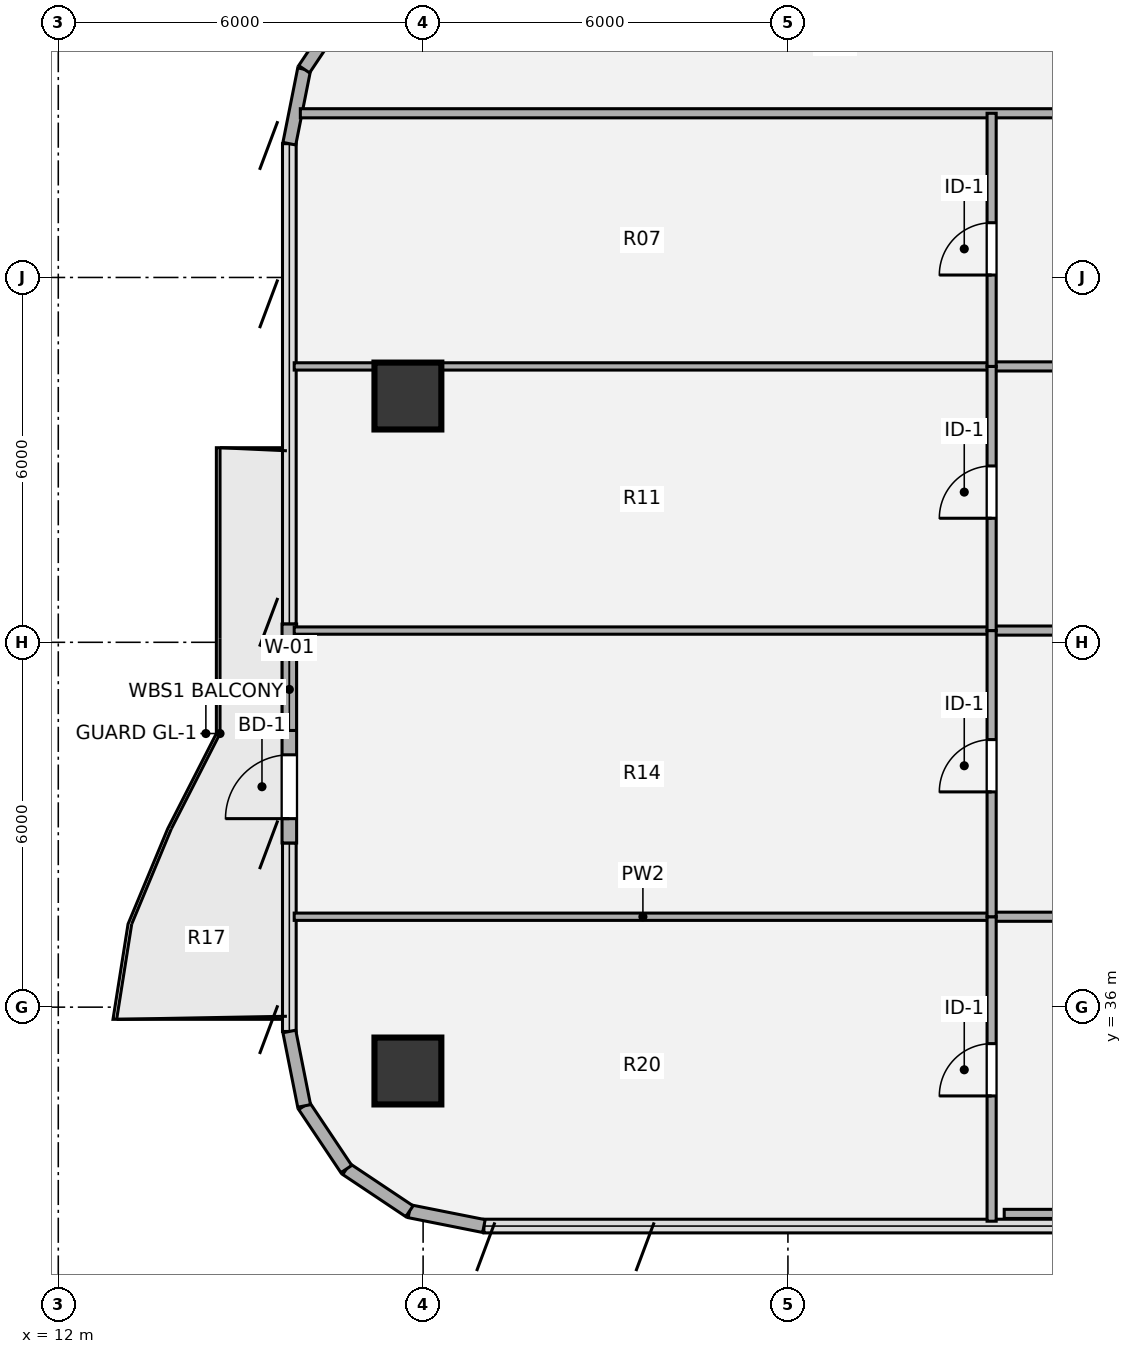
"""IFC4 building model, lengths in metres.
Left out: names, types, materials, properties, quantities, classifications, styles, units other than length and angle.
Written with IfcOpenShell. Run it as: python <this file> out.ifc"""

import sys

from ifc_helpers import new_model, si_unit, direction, frame, frame_2d, origin, origin_2d, place, context, subcontext, project, spatial, rectangle, hollow_circle, extrude, source, transform, mapped, element, fill, save


model = new_model("IFC4")
c1 = context("Model", 3, precision=1e-05, world=origin(), true_north=direction((0.0, 1.0)))
c2 = subcontext(c1, "Body", "Model", "MODEL_VIEW")
j1 = project(units=[si_unit("LENGTHUNIT", "METRE"), si_unit("PLANEANGLEUNIT", "RADIAN")], contexts=[c1])
p1 = place(None, origin())
s1 = spatial("IfcSite", under=j1, at=p1, CompositionType="ELEMENT")
p2 = place(p1, origin())
s2 = spatial("IfcBuilding", under=s1, at=p2, CompositionType="ELEMENT")
p3 = place(p2, frame((0.0, 0.0, 198.0)))
s3 = spatial("IfcBuildingStorey", under=s2, at=p3, CompositionType="ELEMENT", Elevation=198.0)
m1 = source(origin(), c2, "Body", "SweptSolid", [
    extrude(hollow_circle(Radius=0.55, WallThickness=0.04, at=origin_2d()), origin(), (0.0, 0.0, 1.0), 3.78),
])
for number, where, z_axis, x_axis in (
    (1, (17.75, 34.95, 0.0), (0.0, 0.0, 1.0), (1.0, 0.0, 0.0)),
    (2, (17.75, 46.05, 0.0), (0.0, 0.0, 1.0), (1.0, 0.0, 0.0)),
):
    element("IfcColumn", number, at=place(p3, frame(where, z_axis=z_axis, x_axis=x_axis)), inside=s3, PredefinedType="COLUMN", context=c2, shape_type="MappedRepresentation", body=[
        mapped(m1, transform((0.0, 0.0, 0.0), x_axis=(1.0, 0.0, 0.0), y_axis=(0.0, 1.0, 0.0), z_axis=(0.0, 0.0, 1.0), scale=1.0)),
    ])
for number, where, z_axis, x_axis in (
    (3, (19.0, 32.4, 0.0), (0.0, 0.0, 1.0), (-0.981, 0.195, 0.0)),
    (4, (17.775, 32.644, 0.0), (0.0, 0.0, 1.0), (-0.831, 0.556, 0.0)),
    (5, (16.737, 33.337, 0.0), (0.0, 0.0, 1.0), (-0.556, 0.831, 0.0)),
    (6, (16.044, 34.375, 0.0), (0.0, 0.0, 1.0), (-0.195, 0.981, 0.0)),
):
    element("IfcWall", number, at=place(p3, frame(where, z_axis=z_axis, x_axis=x_axis)), inside=s3, PredefinedType="SOLIDWALL", context=c2, shape_type="SweptSolid", body=[
        extrude(rectangle(XDim=1.249, YDim=0.215, at=frame_2d((0.624, 0.0))), origin(), (0.0, 0.0, 1.0), 3.53),
    ])
p4 = place(p3, frame((15.8, 38.7, 0.0), z_axis=(0.0, 0.0, 1.0), x_axis=(0.0, 1.0, 0.0)))
e7 = element("IfcWall", 7, at=p4, inside=s3, PredefinedType="SOLIDWALL", context=c2, shape_type="SweptSolid", body=[
    extrude(rectangle(XDim=3.6, YDim=0.24, at=frame_2d((1.8, 0.0))), origin(), (0.0, 0.0, 1.0), 3.53),
])
p5 = place(p4, frame((0.4, 0.0, 0.0)))
e8 = element("IfcOpeningElement", 8, at=p5, cuts=e7, PredefinedType="OPENING", context=c2, shape_type="SweptSolid", body=[
    extrude(rectangle(XDim=1.05, YDim=2.15, at=origin_2d()), frame((0.525, 0.13, 1.075), z_axis=(0.0, -1.0, 0.0), x_axis=(1.0, 0.0, 0.0)), (0.0, 0.0, 1.0), 0.26),
])
p6 = place(p4, frame((1.85, 0.0, 0.85)))
e9 = element("IfcOpeningElement", 9, at=p6, cuts=e7, PredefinedType="OPENING", context=c2, shape_type="SweptSolid", body=[
    extrude(rectangle(XDim=1.35, YDim=1.35, at=origin_2d()), frame((0.675, 0.13, 0.675), z_axis=(0.0, -1.0, 0.0), x_axis=(1.0, 0.0, 0.0)), (0.0, 0.0, 1.0), 0.26),
])
for number, where, z_axis, x_axis in (
    (10, (15.8, 50.2, 0.0), (0.0, 0.0, 1.0), (0.195, 0.981, 0.0)),
    (11, (16.044, 51.425, 0.0), (0.0, 0.0, 1.0), (0.556, 0.831, 0.0)),
):
    element("IfcWall", number, at=place(p3, frame(where, z_axis=z_axis, x_axis=x_axis)), inside=s3, PredefinedType="SOLIDWALL", context=c2, shape_type="SweptSolid", body=[
        extrude(rectangle(XDim=1.249, YDim=0.215, at=frame_2d((0.624, 0.0))), origin(), (0.0, 0.0, 1.0), 3.53),
    ])
p7 = place(p3, frame((27.557, 32.6, 0.0), z_axis=(0.0, 0.0, 1.0), x_axis=(1.0, 0.0, 0.0)))
e12 = element("IfcWall", 12, at=p7, inside=s3, PredefinedType="PARTITIONING", context=c2, shape_type="SweptSolid", body=[
    extrude(rectangle(XDim=5.993, YDim=0.15, at=frame_2d((2.997, 0.0))), origin(), (0.0, 0.0, 1.0), 3.5),
])
p8 = place(p3, frame((15.88, 37.487, 0.0), z_axis=(0.0, 0.0, 1.0), x_axis=(1.0, 0.0, 0.0)))
e13 = element("IfcWall", 13, at=p8, inside=s3, PredefinedType="PARTITIONING", context=c2, shape_type="SweptSolid", body=[
    extrude(rectangle(XDim=11.47, YDim=0.12, at=frame_2d((5.735, 0.0))), origin(), (0.0, 0.0, 1.0), 3.055),
])
p9 = place(p3, frame((27.35, 37.487, 0.0), z_axis=(0.0, 0.0, 1.0), x_axis=(1.0, 0.0, 0.0)))
e14 = element("IfcWall", 14, at=p9, inside=s3, PredefinedType="PARTITIONING", context=c2, shape_type="SweptSolid", body=[
    extrude(rectangle(XDim=6.2, YDim=0.15, at=frame_2d((3.1, 0.0))), origin(), (0.0, 0.0, 1.0), 3.055),
])
p10 = place(p3, frame((15.88, 42.193, 0.0), z_axis=(0.0, 0.0, 1.0), x_axis=(1.0, 0.0, 0.0)))
e15 = element("IfcWall", 15, at=p10, inside=s3, PredefinedType="PARTITIONING", context=c2, shape_type="SweptSolid", body=[
    extrude(rectangle(XDim=11.47, YDim=0.12, at=frame_2d((5.735, 0.0))), origin(), (0.0, 0.0, 1.0), 2.982),
])
p11 = place(p3, frame((27.35, 42.193, 0.0), z_axis=(0.0, 0.0, 1.0), x_axis=(1.0, 0.0, 0.0)))
e16 = element("IfcWall", 16, at=p11, inside=s3, PredefinedType="PARTITIONING", context=c2, shape_type="SweptSolid", body=[
    extrude(rectangle(XDim=6.2, YDim=0.15, at=frame_2d((3.1, 0.0))), origin(), (0.0, 0.0, 1.0), 2.982),
])
p12 = place(p3, frame((15.88, 46.537, 0.0), z_axis=(0.0, 0.0, 1.0), x_axis=(1.0, 0.0, 0.0)))
e17 = element("IfcWall", 17, at=p12, inside=s3, PredefinedType="PARTITIONING", context=c2, shape_type="SweptSolid", body=[
    extrude(rectangle(XDim=11.47, YDim=0.12, at=frame_2d((5.735, 0.0))), origin(), (0.0, 0.0, 1.0), 3.5),
])
p13 = place(p3, frame((27.35, 46.537, 0.0), z_axis=(0.0, 0.0, 1.0), x_axis=(1.0, 0.0, 0.0)))
e18 = element("IfcWall", 18, at=p13, inside=s3, PredefinedType="PARTITIONING", context=c2, shape_type="SweptSolid", body=[
    extrude(rectangle(XDim=6.2, YDim=0.15, at=frame_2d((3.1, 0.0))), origin(), (0.0, 0.0, 1.0), 3.259),
])
p14 = place(p3, frame((15.981, 50.7, 0.0), z_axis=(0.0, 0.0, 1.0), x_axis=(1.0, 0.0, 0.0)))
e19 = element("IfcWall", 19, at=p14, inside=s3, PredefinedType="PARTITIONING", context=c2, shape_type="SweptSolid", body=[
    extrude(rectangle(XDim=17.569, YDim=0.15, at=frame_2d((8.785, 0.0))), origin(), (0.0, 0.0, 1.0), 3.308),
])
p15 = place(p3, frame((27.35, 32.48, 0.0), z_axis=(0.0, 0.0, 1.0), x_axis=(0.0, 1.0, 0.0)))
e20 = element("IfcWall", 20, at=p15, inside=s3, PredefinedType="PARTITIONING", context=c2, shape_type="SweptSolid", body=[
    extrude(rectangle(XDim=5.007, YDim=0.15, at=frame_2d((2.503, 0.0))), origin(), (0.0, 0.0, 1.0), 3.5),
])
p16 = place(p15, frame((2.06, 0.0, 0.0)))
e21 = element("IfcOpeningElement", 21, at=p16, cuts=e20, PredefinedType="OPENING", context=c2, shape_type="SweptSolid", body=[
    extrude(rectangle(XDim=0.86, YDim=2.1, at=origin_2d()), frame((0.43, 0.085, 1.05), z_axis=(0.0, -1.0, 0.0), x_axis=(1.0, 0.0, 0.0)), (0.0, 0.0, 1.0), 0.17),
])
p17 = place(p3, frame((27.35, 37.487, 0.0), z_axis=(0.0, 0.0, 1.0), x_axis=(0.0, 1.0, 0.0)))
e22 = element("IfcWall", 22, at=p17, inside=s3, PredefinedType="PARTITIONING", context=c2, shape_type="SweptSolid", body=[
    extrude(rectangle(XDim=4.706, YDim=0.15, at=frame_2d((2.353, 0.0))), origin(), (0.0, 0.0, 1.0), 3.5),
])
p18 = place(p17, frame((2.053, 0.0, 0.0)))
e23 = element("IfcOpeningElement", 23, at=p18, cuts=e22, PredefinedType="OPENING", context=c2, shape_type="SweptSolid", body=[
    extrude(rectangle(XDim=0.86, YDim=2.1, at=origin_2d()), frame((0.43, 0.085, 1.05), z_axis=(0.0, -1.0, 0.0), x_axis=(1.0, 0.0, 0.0)), (0.0, 0.0, 1.0), 0.17),
])
p19 = place(p3, frame((27.35, 42.193, 0.0), z_axis=(0.0, 0.0, 1.0), x_axis=(0.0, 1.0, 0.0)))
e24 = element("IfcWall", 24, at=p19, inside=s3, PredefinedType="PARTITIONING", context=c2, shape_type="SweptSolid", body=[
    extrude(rectangle(XDim=4.344, YDim=0.15, at=frame_2d((2.172, 0.0))), origin(), (0.0, 0.0, 1.0), 3.5),
])
p20 = place(p19, frame((1.847, 0.0, 0.0)))
e25 = element("IfcOpeningElement", 25, at=p20, cuts=e24, PredefinedType="OPENING", context=c2, shape_type="SweptSolid", body=[
    extrude(rectangle(XDim=0.86, YDim=2.1, at=origin_2d()), frame((0.43, 0.085, 1.05), z_axis=(0.0, -1.0, 0.0), x_axis=(1.0, 0.0, 0.0)), (0.0, 0.0, 1.0), 0.17),
])
p21 = place(p3, frame((27.35, 46.537, 0.0), z_axis=(0.0, 0.0, 1.0), x_axis=(0.0, 1.0, 0.0)))
e26 = element("IfcWall", 26, at=p21, inside=s3, PredefinedType="PARTITIONING", context=c2, shape_type="SweptSolid", body=[
    extrude(rectangle(XDim=4.163, YDim=0.15, at=frame_2d((2.082, 0.0))), origin(), (0.0, 0.0, 1.0), 3.5),
])
p22 = place(p21, frame((1.503, 0.0, 0.0)))
e27 = element("IfcOpeningElement", 27, at=p22, cuts=e26, PredefinedType="OPENING", context=c2, shape_type="SweptSolid", body=[
    extrude(rectangle(XDim=0.86, YDim=2.1, at=origin_2d()), frame((0.43, 0.085, 1.05), z_axis=(0.0, -1.0, 0.0), x_axis=(1.0, 0.0, 0.0)), (0.0, 0.0, 1.0), 0.17),
])
m2 = source(origin(), c2, "Body", "SweptSolid", [
    extrude(rectangle(XDim=1.05, YDim=2.15, at=origin_2d()), frame((0.525, 0.025, 1.075), z_axis=(0.0, -1.0, 0.0), x_axis=(1.0, 0.0, 0.0)), (0.0, 0.0, 1.0), 0.05),
])
p23 = place(p5, origin())
e28 = element("IfcDoor", 28, at=p23, inside=s3, OperationType="SINGLE_SWING_LEFT", PredefinedType="DOOR", context=c2, shape_type="MappedRepresentation", body=[
    mapped(m2, transform((0.0, 0.0, 0.0), x_axis=(1.0, 0.0, 0.0), y_axis=(0.0, 1.0, 0.0), z_axis=(0.0, 0.0, 1.0), scale=1.0)),
])
fill(e8, e28)
m3 = source(origin(), c2, "Body", "SweptSolid", [
    extrude(rectangle(XDim=1.35, YDim=1.35, at=origin_2d()), frame((0.675, 0.03, 0.675), z_axis=(0.0, -1.0, 0.0), x_axis=(1.0, 0.0, 0.0)), (0.0, 0.0, 1.0), 0.06),
])
p24 = place(p6, origin())
e29 = element("IfcWindow", 29, at=p24, inside=s3, PartitioningType="SINGLE_PANEL", PredefinedType="WINDOW", context=c2, shape_type="MappedRepresentation", body=[
    mapped(m3, transform((0.0, 0.0, 0.0), x_axis=(1.0, 0.0, 0.0), y_axis=(0.0, 1.0, 0.0), z_axis=(0.0, 0.0, 1.0), scale=1.0)),
])
fill(e9, e29)
m4 = source(origin(), c2, "Body", "SweptSolid", [
    extrude(rectangle(XDim=0.86, YDim=2.1, at=origin_2d()), frame((0.43, 0.025, 1.05), z_axis=(0.0, -1.0, 0.0), x_axis=(1.0, 0.0, 0.0)), (0.0, 0.0, 1.0), 0.05),
])
p25 = place(p16, origin())
e30 = element("IfcDoor", 30, at=p25, inside=s3, OperationType="SINGLE_SWING_LEFT", PredefinedType="DOOR", context=c2, shape_type="MappedRepresentation", body=[
    mapped(m4, transform((0.0, 0.0, 0.0), x_axis=(1.0, 0.0, 0.0), y_axis=(0.0, 1.0, 0.0), z_axis=(0.0, 0.0, 1.0), scale=1.0)),
])
fill(e21, e30)
p26 = place(p18, origin())
e31 = element("IfcDoor", 31, at=p26, inside=s3, OperationType="SINGLE_SWING_LEFT", PredefinedType="DOOR", context=c2, shape_type="MappedRepresentation", body=[
    mapped(m4, transform((0.0, 0.0, 0.0), x_axis=(1.0, 0.0, 0.0), y_axis=(0.0, 1.0, 0.0), z_axis=(0.0, 0.0, 1.0), scale=1.0)),
])
fill(e23, e31)
p27 = place(p20, origin())
e32 = element("IfcDoor", 32, at=p27, inside=s3, OperationType="SINGLE_SWING_LEFT", PredefinedType="DOOR", context=c2, shape_type="MappedRepresentation", body=[
    mapped(m4, transform((0.0, 0.0, 0.0), x_axis=(1.0, 0.0, 0.0), y_axis=(0.0, 1.0, 0.0), z_axis=(0.0, 0.0, 1.0), scale=1.0)),
])
fill(e25, e32)
p28 = place(p22, origin())
e33 = element("IfcDoor", 33, at=p28, inside=s3, OperationType="SINGLE_SWING_LEFT", PredefinedType="DOOR", context=c2, shape_type="MappedRepresentation", body=[
    mapped(m4, transform((0.0, 0.0, 0.0), x_axis=(1.0, 0.0, 0.0), y_axis=(0.0, 1.0, 0.0), z_axis=(0.0, 0.0, 1.0), scale=1.0)),
])
fill(e27, e33)
save(model, sys.argv[1])
